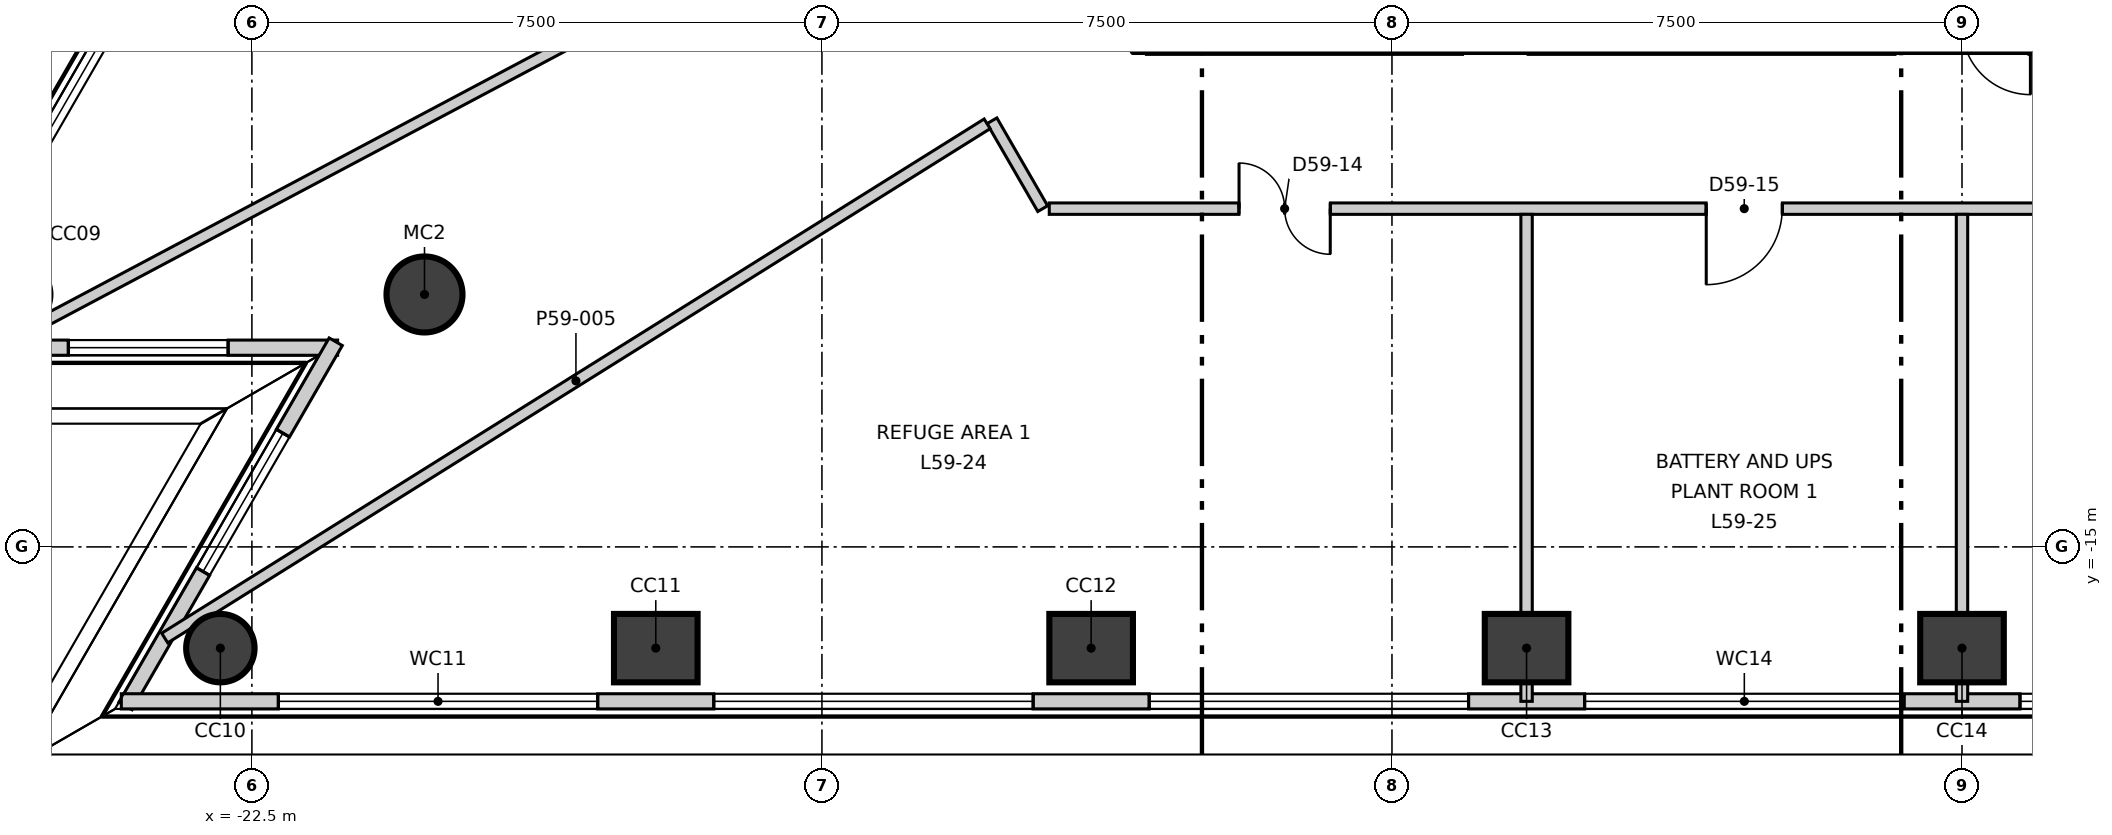
"""IFC4 building model, lengths in metres.
Left out: names, types, materials, properties, quantities, classifications, styles, units other than length and angle.
Written with IfcOpenShell. Run it as: python <this file> out.ifc"""

import sys

from ifc_helpers import new_model, si_unit, direction, frame, frame_2d, origin, origin_2d, place, context, subcontext, project, spatial, polyline, rectangle, circle, outline, extrude, element, fill, save


model = new_model("IFC4")
c1 = context("Model", 3, precision=1e-05, world=origin(), true_north=direction((0.0, 1.0)))
c2 = subcontext(c1, "Body", "Model", "MODEL_VIEW")
j1 = project(units=[si_unit("LENGTHUNIT", "METRE"), si_unit("PLANEANGLEUNIT", "RADIAN")], contexts=[c1])
p1 = place(None, origin())
s1 = spatial("IfcSite", under=j1, at=p1, CompositionType="ELEMENT")
p2 = place(p1, origin())
s2 = spatial("IfcBuilding", under=s1, at=p2, CompositionType="ELEMENT")
p3 = place(p2, frame((0.0, 0.0, 251.3)))
s3 = spatial("IfcBuildingStorey", under=s2, at=p3, CompositionType="ELEMENT", Elevation=251.3)
p4 = place(p3, frame((-12.413, -5.2, -0.3), z_axis=(0.0, 0.0, 1.0), x_axis=(0.49999337185, -0.866029230515, 0.0)))
e1 = element("IfcWall", 1, at=p4, inside=s3, PredefinedType="SHEAR", context=c2, shape_type="SweptSolid", body=[
    extrude(outline(polyline([(-0.202, -0.35), (1.703, -0.35), (3.608, -0.35), (3.204, 0.35), (1.703, 0.35), (0.202, 0.35), (-0.202, -0.35)])), origin(), (0.0, 0.0, 1.0), 4.2),
])
p5 = place(p4, frame((1.553, 0.0, 0.3)))
e2 = element("IfcOpeningElement", 2, at=p5, cuts=e1, PredefinedType="OPENING", context=c2, shape_type="SweptSolid", body=[
    extrude(rectangle(XDim=1.4, YDim=2.1, at=frame_2d((0.7, 1.05))), frame((0.0, 0.36, 0.0), z_axis=(0.0, -1.0, 0.0), x_axis=(1.0, 0.0, 0.0)), (0.0, 0.0, 1.0), 0.72),
])
p6 = place(p3, frame((-10.71, -8.15, -0.3), z_axis=(0.0, 0.0, 1.0), x_axis=(1.0, 0.0, 0.0)))
e3 = element("IfcWall", 3, at=p6, inside=s3, PredefinedType="SHEAR", context=c2, shape_type="SweptSolid", body=[
    extrude(outline(polyline([(-0.202, -0.35), (1.782, -0.35), (3.766, -0.35), (5.75, -0.35), (7.734, -0.35), (9.718, -0.35), (11.702, -0.35), (13.686, -0.35), (15.67, -0.35), (17.654, -0.35), (19.638, -0.35), (21.622, -0.35), (21.218, 0.35), (19.307, 0.35), (17.397, 0.35), (15.486, 0.35), (13.576, 0.35), (11.665, 0.35), (9.755, 0.35), (7.844, 0.35), (5.934, 0.35), (4.023, 0.35), (2.113, 0.35), (0.202, 0.35), (-0.202, -0.35)])), origin(), (0.0, 0.0, 1.0), 4.2),
])
p7 = place(p6, frame((9.81, 0.0, 0.3)))
e4 = element("IfcOpeningElement", 4, at=p7, cuts=e3, PredefinedType="OPENING", context=c2, shape_type="SweptSolid", body=[
    extrude(rectangle(XDim=1.8, YDim=2.1, at=frame_2d((0.9, 1.05))), frame((0.0, 0.36, 0.0), z_axis=(0.0, -1.0, 0.0), x_axis=(1.0, 0.0, 0.0)), (0.0, 0.0, 1.0), 0.72),
])
p8 = place(p6, frame((4.12, 0.0, 0.3)))
e5 = element("IfcOpeningElement", 5, at=p8, cuts=e3, PredefinedType="OPENING", context=c2, shape_type="SweptSolid", body=[
    extrude(rectangle(XDim=0.9, YDim=2.1, at=frame_2d((0.45, 1.05))), frame((0.0, 0.36, 0.0), z_axis=(0.0, -1.0, 0.0), x_axis=(1.0, 0.0, 0.0)), (0.0, 0.0, 1.0), 0.72),
])
p9 = place(p3, frame((-22.915, -16.332, -0.3), z_axis=(0.0, 0.0, 1.0), x_axis=(1.0, 0.0, 0.0)))
e6 = element("IfcColumn", 6, at=p9, inside=s3, PredefinedType="COLUMN", context=c2, shape_type="SweptSolid", body=[
    extrude(circle(Radius=0.45, at=origin_2d()), origin(), (0.0, 0.0, 1.0), 4.2),
])
for number, where, z_axis, x_axis in (
    (7, (-17.186, -16.332, -0.3), (0.0, 0.0, 1.0), (1.0, 0.0, 0.0)),
    (8, (-11.458, -16.332, -0.3), (0.0, 0.0, 1.0), (1.0, 0.0, 0.0)),
    (9, (-5.729, -16.332, -0.3), (0.0, 0.0, 1.0), (1.0, 0.0, 0.0)),
    (10, (0.0, -16.332, -0.3), (0.0, 0.0, 1.0), (1.0, 0.0, 0.0)),
):
    element("IfcColumn", number, at=place(p3, frame(where, z_axis=z_axis, x_axis=x_axis)), inside=s3, PredefinedType="COLUMN", context=c2, shape_type="SweptSolid", body=[
        extrude(rectangle(XDim=1.1, YDim=0.9, at=origin_2d()), origin(), (0.0, 0.0, 1.0), 4.2),
    ])
p10 = place(p3, frame((-20.229, -11.679, -0.3), z_axis=(0.0, 0.0, 1.0), x_axis=(1.0, 0.0, 0.0)))
e11 = element("IfcColumn", 11, at=p10, inside=s3, PredefinedType="COLUMN", context=c2, shape_type="SweptSolid", body=[
    extrude(circle(Radius=0.5, at=origin_2d()), origin(), (0.0, 0.0, 1.0), 4.2),
])
p11 = place(p3, frame((-2.641, 29.489, 0.0), z_axis=(0.0, 0.0, 1.0), x_axis=(-0.500004868955, -0.866022592674, 0.0)))
e12 = element("IfcWall", 12, at=p11, inside=s3, PredefinedType="ELEMENTEDWALL", context=c2, shape_type="SweptSolid", body=[
    extrude(rectangle(XDim=48.416, YDim=0.2, at=frame_2d((24.208, 0.0))), origin(), (0.0, 0.0, 1.0), 3.9),
])
p12 = place(p11, frame((2.067, 0.0, 0.9)))
e13 = element("IfcOpeningElement", 13, at=p12, cuts=e12, PredefinedType="OPENING", context=c2, shape_type="SweptSolid", body=[
    extrude(rectangle(XDim=4.2, YDim=2.5, at=frame_2d((2.1, 1.25))), frame((0.0, 0.11, 0.0), z_axis=(0.0, -1.0, 0.0), x_axis=(1.0, 0.0, 0.0)), (0.0, 0.0, 1.0), 0.22),
])
p13 = place(p11, frame((7.796, 0.0, 0.9)))
e14 = element("IfcOpeningElement", 14, at=p13, cuts=e12, PredefinedType="OPENING", context=c2, shape_type="SweptSolid", body=[
    extrude(rectangle(XDim=4.2, YDim=2.5, at=frame_2d((2.1, 1.25))), frame((0.0, 0.11, 0.0), z_axis=(0.0, -1.0, 0.0), x_axis=(1.0, 0.0, 0.0)), (0.0, 0.0, 1.0), 0.22),
])
p14 = place(p11, frame((13.524, 0.0, 0.9)))
e15 = element("IfcOpeningElement", 15, at=p14, cuts=e12, PredefinedType="OPENING", context=c2, shape_type="SweptSolid", body=[
    extrude(rectangle(XDim=4.2, YDim=2.5, at=frame_2d((2.1, 1.25))), frame((0.0, 0.11, 0.0), z_axis=(0.0, -1.0, 0.0), x_axis=(1.0, 0.0, 0.0)), (0.0, 0.0, 1.0), 0.22),
])
p15 = place(p11, frame((19.253, 0.0, 0.9)))
e16 = element("IfcOpeningElement", 16, at=p15, cuts=e12, PredefinedType="OPENING", context=c2, shape_type="SweptSolid", body=[
    extrude(rectangle(XDim=4.2, YDim=2.5, at=frame_2d((2.1, 1.25))), frame((0.0, 0.11, 0.0), z_axis=(0.0, -1.0, 0.0), x_axis=(1.0, 0.0, 0.0)), (0.0, 0.0, 1.0), 0.22),
])
p16 = place(p11, frame((24.982, 0.0, 0.9)))
e17 = element("IfcOpeningElement", 17, at=p16, cuts=e12, PredefinedType="OPENING", context=c2, shape_type="SweptSolid", body=[
    extrude(rectangle(XDim=4.2, YDim=2.5, at=frame_2d((2.1, 1.25))), frame((0.0, 0.11, 0.0), z_axis=(0.0, -1.0, 0.0), x_axis=(1.0, 0.0, 0.0)), (0.0, 0.0, 1.0), 0.22),
])
p17 = place(p11, frame((30.711, 0.0, 0.9)))
e18 = element("IfcOpeningElement", 18, at=p17, cuts=e12, PredefinedType="OPENING", context=c2, shape_type="SweptSolid", body=[
    extrude(rectangle(XDim=4.2, YDim=2.5, at=frame_2d((2.1, 1.25))), frame((0.0, 0.11, 0.0), z_axis=(0.0, -1.0, 0.0), x_axis=(1.0, 0.0, 0.0)), (0.0, 0.0, 1.0), 0.22),
])
p18 = place(p11, frame((36.439, 0.0, 0.9)))
e19 = element("IfcOpeningElement", 19, at=p18, cuts=e12, PredefinedType="OPENING", context=c2, shape_type="SweptSolid", body=[
    extrude(rectangle(XDim=4.2, YDim=2.5, at=frame_2d((2.1, 1.25))), frame((0.0, 0.11, 0.0), z_axis=(0.0, -1.0, 0.0), x_axis=(1.0, 0.0, 0.0)), (0.0, 0.0, 1.0), 0.22),
])
p19 = place(p11, frame((42.168, 0.0, 0.9)))
e20 = element("IfcOpeningElement", 20, at=p19, cuts=e12, PredefinedType="OPENING", context=c2, shape_type="SweptSolid", body=[
    extrude(rectangle(XDim=4.2, YDim=2.5, at=frame_2d((2.1, 1.25))), frame((0.0, 0.11, 0.0), z_axis=(0.0, -1.0, 0.0), x_axis=(1.0, 0.0, 0.0)), (0.0, 0.0, 1.0), 0.22),
])
p20 = place(p3, frame((-26.904, -12.379, 0.0), z_axis=(0.0, 0.0, 1.0), x_axis=(1.0, 0.0, 0.0)))
e21 = element("IfcWall", 21, at=p20, inside=s3, PredefinedType="ELEMENTEDWALL", context=c2, shape_type="SweptSolid", body=[
    extrude(rectangle(XDim=5.532, YDim=0.2, at=frame_2d((2.766, 0.0))), origin(), (0.0, 0.0, 1.0), 3.9),
])
p21 = place(p20, frame((1.99, 0.0, 0.9)))
e22 = element("IfcOpeningElement", 22, at=p21, cuts=e21, PredefinedType="OPENING", context=c2, shape_type="SweptSolid", body=[
    extrude(rectangle(XDim=2.1, YDim=2.5, at=frame_2d((1.05, 1.25))), frame((0.0, 0.11, 0.0), z_axis=(0.0, -1.0, 0.0), x_axis=(1.0, 0.0, 0.0)), (0.0, 0.0, 1.0), 0.22),
])
p22 = place(p3, frame((-21.397, -12.301, 0.0), z_axis=(0.0, 0.0, 1.0), x_axis=(-0.499926164748, -0.866068028391, 0.0)))
e23 = element("IfcWall", 23, at=p22, inside=s3, PredefinedType="ELEMENTEDWALL", context=c2, shape_type="SweptSolid", body=[
    extrude(rectangle(XDim=5.533, YDim=0.2, at=frame_2d((2.767, 0.0))), origin(), (0.0, 0.0, 1.0), 3.9),
])
p23 = place(p22, frame((1.39, 0.0, 0.9)))
e24 = element("IfcOpeningElement", 24, at=p23, cuts=e23, PredefinedType="OPENING", context=c2, shape_type="SweptSolid", body=[
    extrude(rectangle(XDim=2.1, YDim=2.5, at=frame_2d((1.05, 1.25))), frame((0.0, 0.11, 0.0), z_axis=(0.0, -1.0, 0.0), x_axis=(1.0, 0.0, 0.0)), (0.0, 0.0, 1.0), 0.22),
])
p24 = place(p3, frame((-24.218, -17.032, 0.0), z_axis=(0.0, 0.0, 1.0), x_axis=(1.0, 0.0, 0.0)))
e25 = element("IfcWall", 25, at=p24, inside=s3, PredefinedType="ELEMENTEDWALL", context=c2, shape_type="SweptSolid", body=[
    extrude(rectangle(XDim=48.416, YDim=0.2, at=frame_2d((24.208, 0.0))), origin(), (0.0, 0.0, 1.0), 3.9),
])
p25 = place(p24, frame((2.067, 0.0, 0.9)))
e26 = element("IfcOpeningElement", 26, at=p25, cuts=e25, PredefinedType="OPENING", context=c2, shape_type="SweptSolid", body=[
    extrude(rectangle(XDim=4.2, YDim=2.5, at=frame_2d((2.1, 1.25))), frame((0.0, 0.11, 0.0), z_axis=(0.0, -1.0, 0.0), x_axis=(1.0, 0.0, 0.0)), (0.0, 0.0, 1.0), 0.22),
])
p26 = place(p24, frame((7.796, 0.0, 0.9)))
e27 = element("IfcOpeningElement", 27, at=p26, cuts=e25, PredefinedType="OPENING", context=c2, shape_type="SweptSolid", body=[
    extrude(rectangle(XDim=4.2, YDim=2.5, at=frame_2d((2.1, 1.25))), frame((0.0, 0.11, 0.0), z_axis=(0.0, -1.0, 0.0), x_axis=(1.0, 0.0, 0.0)), (0.0, 0.0, 1.0), 0.22),
])
p27 = place(p24, frame((13.525, 0.0, 0.9)))
e28 = element("IfcOpeningElement", 28, at=p27, cuts=e25, PredefinedType="OPENING", context=c2, shape_type="SweptSolid", body=[
    extrude(rectangle(XDim=4.2, YDim=2.5, at=frame_2d((2.1, 1.25))), frame((0.0, 0.11, 0.0), z_axis=(0.0, -1.0, 0.0), x_axis=(1.0, 0.0, 0.0)), (0.0, 0.0, 1.0), 0.22),
])
p28 = place(p24, frame((19.254, 0.0, 0.9)))
e29 = element("IfcOpeningElement", 29, at=p28, cuts=e25, PredefinedType="OPENING", context=c2, shape_type="SweptSolid", body=[
    extrude(rectangle(XDim=4.2, YDim=2.5, at=frame_2d((2.1, 1.25))), frame((0.0, 0.11, 0.0), z_axis=(0.0, -1.0, 0.0), x_axis=(1.0, 0.0, 0.0)), (0.0, 0.0, 1.0), 0.22),
])
p29 = place(p24, frame((24.982, 0.0, 0.9)))
e30 = element("IfcOpeningElement", 30, at=p29, cuts=e25, PredefinedType="OPENING", context=c2, shape_type="SweptSolid", body=[
    extrude(rectangle(XDim=4.2, YDim=2.5, at=frame_2d((2.1, 1.25))), frame((0.0, 0.11, 0.0), z_axis=(0.0, -1.0, 0.0), x_axis=(1.0, 0.0, 0.0)), (0.0, 0.0, 1.0), 0.22),
])
p30 = place(p24, frame((30.711, 0.0, 0.9)))
e31 = element("IfcOpeningElement", 31, at=p30, cuts=e25, PredefinedType="OPENING", context=c2, shape_type="SweptSolid", body=[
    extrude(rectangle(XDim=4.2, YDim=2.5, at=frame_2d((2.1, 1.25))), frame((0.0, 0.11, 0.0), z_axis=(0.0, -1.0, 0.0), x_axis=(1.0, 0.0, 0.0)), (0.0, 0.0, 1.0), 0.22),
])
p31 = place(p24, frame((36.44, 0.0, 0.9)))
e32 = element("IfcOpeningElement", 32, at=p31, cuts=e25, PredefinedType="OPENING", context=c2, shape_type="SweptSolid", body=[
    extrude(rectangle(XDim=4.2, YDim=2.5, at=frame_2d((2.1, 1.25))), frame((0.0, 0.11, 0.0), z_axis=(0.0, -1.0, 0.0), x_axis=(1.0, 0.0, 0.0)), (0.0, 0.0, 1.0), 0.22),
])
p32 = place(p24, frame((42.169, 0.0, 0.9)))
e33 = element("IfcOpeningElement", 33, at=p32, cuts=e25, PredefinedType="OPENING", context=c2, shape_type="SweptSolid", body=[
    extrude(rectangle(XDim=4.2, YDim=2.5, at=frame_2d((2.1, 1.25))), frame((0.0, 0.11, 0.0), z_axis=(0.0, -1.0, 0.0), x_axis=(1.0, 0.0, 0.0)), (0.0, 0.0, 1.0), 0.22),
])
p33 = place(p3, frame((-12.763, -9.394, 0.0), z_axis=(0.0, 0.0, 1.0), x_axis=(0.500308063137, -0.865847470378, 0.0)))
e34 = element("IfcWall", 34, at=p33, inside=s3, PredefinedType="PARTITIONING", context=c2, shape_type="SweptSolid", body=[
    extrude(rectangle(XDim=1.335, YDim=0.15, at=frame_2d((0.667, 0.0))), origin(), (0.0, 0.0, 1.0), 3.9),
])
p34 = place(p3, frame((-25.889, -12.379, 0.0), z_axis=(0.0, 0.0, 1.0), x_axis=(0.88336885413, 0.468678426593, 0.0)))
e35 = element("IfcWall", 35, at=p34, inside=s3, PredefinedType="PARTITIONING", context=c2, shape_type="SweptSolid", body=[
    extrude(rectangle(XDim=12.793, YDim=0.15, at=frame_2d((6.396, 0.0))), origin(), (0.0, 0.0, 1.0), 3.3),
])
p35 = place(p3, frame((-23.647, -16.199, 0.0), z_axis=(0.0, 0.0, 1.0), x_axis=(0.847937036603, 0.530096955243, 0.0)))
e36 = element("IfcWall", 36, at=p35, inside=s3, PredefinedType="PARTITIONING", context=c2, shape_type="SweptSolid", body=[
    extrude(rectangle(XDim=12.762, YDim=0.15, at=frame_2d((6.381, 0.0))), origin(), (0.0, 0.0, 1.0), 3.3),
])
p36 = place(p3, frame((-12.009, -10.55, 0.0), z_axis=(0.0, 0.0, 1.0), x_axis=(1.0, 0.0, 0.0)))
e37 = element("IfcWall", 37, at=p36, inside=s3, PredefinedType="PARTITIONING", context=c2, shape_type="SweptSolid", body=[
    extrude(rectangle(XDim=24.104, YDim=0.15, at=frame_2d((12.052, 0.0))), origin(), (0.0, 0.0, 1.0), 3.9),
])
p37 = place(p36, frame((2.497, 0.0, 0.0)))
e38 = element("IfcOpeningElement", 38, at=p37, cuts=e37, PredefinedType="OPENING", context=c2, shape_type="SweptSolid", body=[
    extrude(rectangle(XDim=1.2, YDim=2.1, at=frame_2d((0.6, 1.05))), frame((0.0, 0.085, 0.0), z_axis=(0.0, -1.0, 0.0), x_axis=(1.0, 0.0, 0.0)), (0.0, 0.0, 1.0), 0.17),
])
p38 = place(p36, frame((8.644, 0.0, 0.0)))
e39 = element("IfcOpeningElement", 39, at=p38, cuts=e37, PredefinedType="OPENING", context=c2, shape_type="SweptSolid", body=[
    extrude(rectangle(XDim=1.0, YDim=2.1, at=frame_2d((0.5, 1.05))), frame((0.0, 0.085, 0.0), z_axis=(0.0, -1.0, 0.0), x_axis=(1.0, 0.0, 0.0)), (0.0, 0.0, 1.0), 0.17),
])
p39 = place(p36, frame((14.373, 0.0, 0.0)))
e40 = element("IfcOpeningElement", 40, at=p39, cuts=e37, PredefinedType="OPENING", context=c2, shape_type="SweptSolid", body=[
    extrude(rectangle(XDim=1.0, YDim=2.1, at=frame_2d((0.5, 1.05))), frame((0.0, 0.085, 0.0), z_axis=(0.0, -1.0, 0.0), x_axis=(1.0, 0.0, 0.0)), (0.0, 0.0, 1.0), 0.17),
])
p40 = place(p36, frame((20.321, 0.0, 0.0)))
e41 = element("IfcOpeningElement", 41, at=p40, cuts=e37, PredefinedType="OPENING", context=c2, shape_type="SweptSolid", body=[
    extrude(rectangle(XDim=1.2, YDim=2.1, at=frame_2d((0.6, 1.05))), frame((0.0, 0.085, 0.0), z_axis=(0.0, -1.0, 0.0), x_axis=(1.0, 0.0, 0.0)), (0.0, 0.0, 1.0), 0.17),
])
p41 = place(p3, frame((-5.729, -17.032, 0.0), z_axis=(0.0, 0.0, 1.0), x_axis=(0.0, 1.0, 0.0)))
e42 = element("IfcWall", 42, at=p41, inside=s3, PredefinedType="PARTITIONING", context=c2, shape_type="SweptSolid", body=[
    extrude(rectangle(XDim=6.407, YDim=0.15, at=frame_2d((3.204, 0.0))), origin(), (0.0, 0.0, 1.0), 3.9),
])
p42 = place(p3, frame((0.0, -17.032, 0.0), z_axis=(0.0, 0.0, 1.0), x_axis=(0.0, 1.0, 0.0)))
e43 = element("IfcWall", 43, at=p42, inside=s3, PredefinedType="PARTITIONING", context=c2, shape_type="SweptSolid", body=[
    extrude(rectangle(XDim=6.407, YDim=0.15, at=frame_2d((3.204, 0.0))), origin(), (0.0, 0.0, 1.0), 3.4),
])
p43 = place(p19, origin())
e44 = element("IfcWindow", 44, at=p43, inside=s3, PartitioningType="SINGLE_PANEL", PredefinedType="WINDOW", context=c2, shape_type="SweptSolid", body=[
    extrude(rectangle(XDim=4.2, YDim=2.5, at=frame_2d((2.1, 1.25))), frame((0.0, 0.03, 0.0), z_axis=(0.0, -1.0, 0.0), x_axis=(1.0, 0.0, 0.0)), (0.0, 0.0, 1.0), 0.06),
])
fill(e20, e44)
p44 = place(p21, origin())
e45 = element("IfcWindow", 45, at=p44, inside=s3, PartitioningType="SINGLE_PANEL", PredefinedType="WINDOW", context=c2, shape_type="SweptSolid", body=[
    extrude(rectangle(XDim=2.1, YDim=2.5, at=frame_2d((1.05, 1.25))), frame((0.0, 0.03, 0.0), z_axis=(0.0, -1.0, 0.0), x_axis=(1.0, 0.0, 0.0)), (0.0, 0.0, 1.0), 0.06),
])
fill(e22, e45)
p45 = place(p23, origin())
e46 = element("IfcWindow", 46, at=p45, inside=s3, PartitioningType="SINGLE_PANEL", PredefinedType="WINDOW", context=c2, shape_type="SweptSolid", body=[
    extrude(rectangle(XDim=2.1, YDim=2.5, at=frame_2d((1.05, 1.25))), frame((0.0, 0.03, 0.0), z_axis=(0.0, -1.0, 0.0), x_axis=(1.0, 0.0, 0.0)), (0.0, 0.0, 1.0), 0.06),
])
fill(e24, e46)
p46 = place(p25, origin())
e47 = element("IfcWindow", 47, at=p46, inside=s3, PartitioningType="SINGLE_PANEL", PredefinedType="WINDOW", context=c2, shape_type="SweptSolid", body=[
    extrude(rectangle(XDim=4.2, YDim=2.5, at=frame_2d((2.1, 1.25))), frame((0.0, 0.03, 0.0), z_axis=(0.0, -1.0, 0.0), x_axis=(1.0, 0.0, 0.0)), (0.0, 0.0, 1.0), 0.06),
])
fill(e26, e47)
p47 = place(p26, origin())
e48 = element("IfcWindow", 48, at=p47, inside=s3, PartitioningType="SINGLE_PANEL", PredefinedType="WINDOW", context=c2, shape_type="SweptSolid", body=[
    extrude(rectangle(XDim=4.2, YDim=2.5, at=frame_2d((2.1, 1.25))), frame((0.0, 0.03, 0.0), z_axis=(0.0, -1.0, 0.0), x_axis=(1.0, 0.0, 0.0)), (0.0, 0.0, 1.0), 0.06),
])
fill(e27, e48)
p48 = place(p27, origin())
e49 = element("IfcWindow", 49, at=p48, inside=s3, PartitioningType="SINGLE_PANEL", PredefinedType="WINDOW", context=c2, shape_type="SweptSolid", body=[
    extrude(rectangle(XDim=4.2, YDim=2.5, at=frame_2d((2.1, 1.25))), frame((0.0, 0.03, 0.0), z_axis=(0.0, -1.0, 0.0), x_axis=(1.0, 0.0, 0.0)), (0.0, 0.0, 1.0), 0.06),
])
fill(e28, e49)
p49 = place(p28, origin())
e50 = element("IfcWindow", 50, at=p49, inside=s3, PartitioningType="SINGLE_PANEL", PredefinedType="WINDOW", context=c2, shape_type="SweptSolid", body=[
    extrude(rectangle(XDim=4.2, YDim=2.5, at=frame_2d((2.1, 1.25))), frame((0.0, 0.03, 0.0), z_axis=(0.0, -1.0, 0.0), x_axis=(1.0, 0.0, 0.0)), (0.0, 0.0, 1.0), 0.06),
])
fill(e29, e50)
p50 = place(p29, origin())
e51 = element("IfcWindow", 51, at=p50, inside=s3, PartitioningType="SINGLE_PANEL", PredefinedType="WINDOW", context=c2, shape_type="SweptSolid", body=[
    extrude(rectangle(XDim=4.2, YDim=2.5, at=frame_2d((2.1, 1.25))), frame((0.0, 0.03, 0.0), z_axis=(0.0, -1.0, 0.0), x_axis=(1.0, 0.0, 0.0)), (0.0, 0.0, 1.0), 0.06),
])
fill(e30, e51)
p51 = place(p37, origin())
e52 = element("IfcDoor", 52, at=p51, inside=s3, OperationType="DOUBLE_DOOR_SINGLE_SWING", PredefinedType="DOOR", context=c2, shape_type="SweptSolid", body=[
    extrude(rectangle(XDim=1.2, YDim=2.1, at=frame_2d((0.6, 1.05))), frame((0.0, 0.025, 0.0), z_axis=(0.0, -1.0, 0.0), x_axis=(1.0, 0.0, 0.0)), (0.0, 0.0, 1.0), 0.05),
])
fill(e38, e52)
p52 = place(p38, origin())
e53 = element("IfcDoor", 53, at=p52, inside=s3, OperationType="SINGLE_SWING_LEFT", PredefinedType="DOOR", context=c2, shape_type="SweptSolid", body=[
    extrude(rectangle(XDim=1.0, YDim=2.1, at=frame_2d((0.5, 1.05))), frame((0.0, 0.025, 0.0), z_axis=(0.0, -1.0, 0.0), x_axis=(1.0, 0.0, 0.0)), (0.0, 0.0, 1.0), 0.05),
])
fill(e39, e53)
save(model, sys.argv[1])
